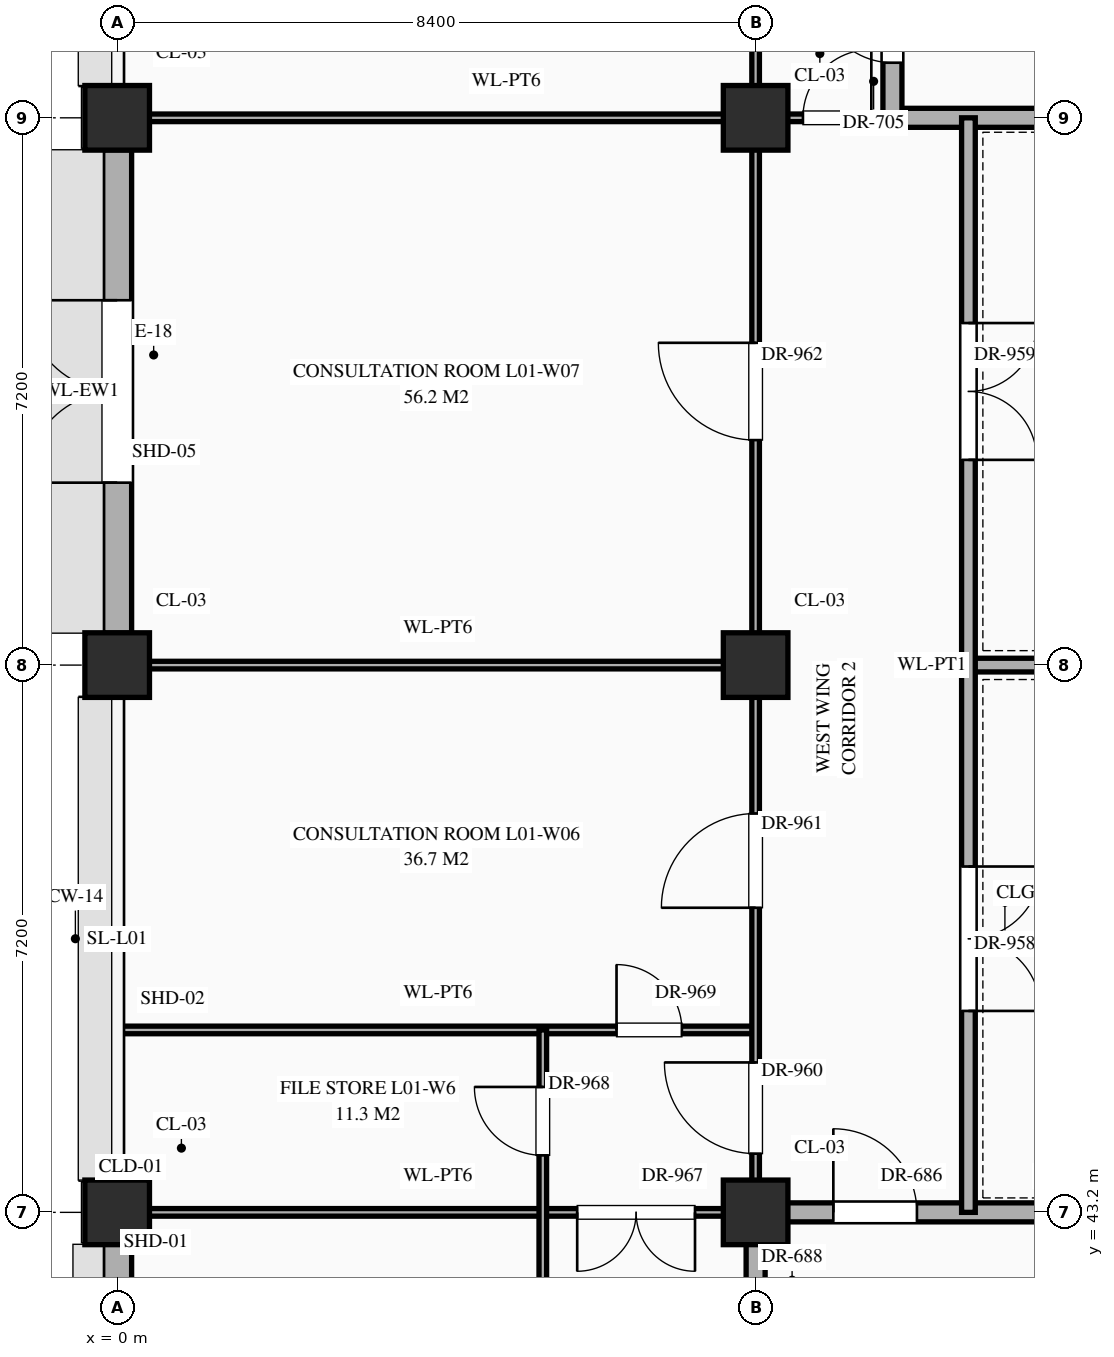
"""IFC4 building model, lengths in metres.
Left out: names, types, materials, properties, quantities, classifications, styles, units other than length and angle.
Written with IfcOpenShell. Run it as: python <this file> out.ifc"""

import sys

from ifc_helpers import new_model, si_unit, direction, frame, frame_2d, origin, origin_2d, place, context, subcontext, project, spatial, rectangle, extrude, element, fill, save


model = new_model("IFC4")
c1 = context("Model", 3, precision=1e-05, world=origin(), true_north=direction((0.0, 1.0)))
c2 = subcontext(c1, "Body", "Model", "MODEL_VIEW")
j1 = project(units=[si_unit("LENGTHUNIT", "METRE"), si_unit("PLANEANGLEUNIT", "RADIAN")], contexts=[c1])
p1 = place(None, origin())
s1 = spatial("IfcSite", under=j1, at=p1, CompositionType="ELEMENT")
p2 = place(p1, origin())
s2 = spatial("IfcBuilding", under=s1, at=p2, CompositionType="ELEMENT")
p3 = place(p2, origin())
s3 = spatial("IfcBuildingStorey", under=s2, at=p3, CompositionType="ELEMENT", Elevation=0.0)
for number, where, z_axis, x_axis in (
    (1, (0.0, 43.2, 0.0), (0.0, 0.0, 1.0), (1.0, 0.0, 0.0)),
    (2, (0.0, 50.4, 0.0), (0.0, 0.0, 1.0), (1.0, 0.0, 0.0)),
    (3, (0.0, 57.6, 0.0), (0.0, 0.0, 1.0), (1.0, 0.0, 0.0)),
    (4, (8.4, 43.2, 0.0), (0.0, 0.0, 1.0), (1.0, 0.0, 0.0)),
    (5, (8.4, 50.4, 0.0), (0.0, 0.0, 1.0), (1.0, 0.0, 0.0)),
    (6, (8.4, 57.6, 0.0), (0.0, 0.0, 1.0), (1.0, 0.0, 0.0)),
):
    element("IfcColumn", number, at=place(p3, frame(where, z_axis=z_axis, x_axis=x_axis)), inside=s3, PredefinedType="COLUMN", context=c2, shape_type="SweptSolid", body=[
        extrude(rectangle(XDim=0.85, YDim=0.85, at=origin_2d()), origin(), (0.0, 0.0, 1.0), 5.4),
    ])
p4 = place(p3, frame((0.0, 36.42, 0.0), z_axis=(0.0, 0.0, 1.0), x_axis=(0.0, 1.0, 0.0)))
e7 = element("IfcWall", 7, at=p4, inside=s3, PredefinedType="STANDARD", context=c2, shape_type="SweptSolid", body=[
    extrude(rectangle(XDim=6.36, YDim=0.38, at=frame_2d((3.18, 0.0))), origin(), (0.0, 0.0, 1.0), 4.47),
])
p5 = place(p4, frame((2.58, 0.0, 0.85)))
e8 = element("IfcOpeningElement", 8, at=p5, cuts=e7, PredefinedType="OPENING", context=c2, shape_type="SweptSolid", body=[
    extrude(rectangle(XDim=1.2, YDim=1.56, at=frame_2d((0.6, 0.78))), frame((0.0, 0.202, 0.0), z_axis=(0.0, -1.0, 0.0), x_axis=(1.0, 0.0, 0.0)), (0.0, 0.0, 1.0), 0.404),
])
p6 = place(p3, frame((0.0, 50.82, 0.0), z_axis=(0.0, 0.0, 1.0), x_axis=(0.0, 1.0, 0.0)))
e9 = element("IfcWall", 9, at=p6, inside=s3, PredefinedType="STANDARD", context=c2, shape_type="SweptSolid", body=[
    extrude(rectangle(XDim=6.36, YDim=0.38, at=frame_2d((3.18, 0.0))), origin(), (0.0, 0.0, 1.0), 4.47),
])
p7 = place(p6, frame((1.98, 0.0, 0.0)))
e10 = element("IfcOpeningElement", 10, at=p7, cuts=e9, PredefinedType="OPENING", context=c2, shape_type="SweptSolid", body=[
    extrude(rectangle(XDim=2.4, YDim=2.4, at=frame_2d((1.2, 1.2))), frame((0.0, 0.202, 0.0), z_axis=(0.0, -1.0, 0.0), x_axis=(1.0, 0.0, 0.0)), (0.0, 0.0, 1.0), 0.404),
])
p8 = place(p3, frame((0.04, 43.2, 0.0), z_axis=(0.0, 0.0, 1.0), x_axis=(1.0, 0.0, 0.0)))
e11 = element("IfcWall", 11, at=p8, inside=s3, PredefinedType="STANDARD", context=c2, shape_type="SweptSolid", body=[
    extrude(rectangle(XDim=8.36, YDim=0.1, at=frame_2d((4.18, 0.0))), origin(), (0.0, 0.0, 1.0), 4.27),
])
p9 = place(p8, frame((6.012, 0.0, 0.0)))
e12 = element("IfcOpeningElement", 12, at=p9, cuts=e11, PredefinedType="OPENING", context=c2, shape_type="SweptSolid", body=[
    extrude(rectangle(XDim=1.55, YDim=2.35, at=frame_2d((0.775, 1.175))), frame((0.0, 0.062, 0.0), z_axis=(0.0, -1.0, 0.0), x_axis=(1.0, 0.0, 0.0)), (0.0, 0.0, 1.0), 0.124),
])
p10 = place(p3, frame((8.4, 43.2, 0.0), z_axis=(0.0, 0.0, 1.0), x_axis=(1.0, 0.0, 0.0)))
e13 = element("IfcWall", 13, at=p10, inside=s3, PredefinedType="STANDARD", context=c2, shape_type="SweptSolid", body=[
    extrude(rectangle(XDim=8.36, YDim=0.25, at=frame_2d((4.18, 0.0))), origin(), (0.0, 0.0, 1.0), 4.27),
])
p11 = place(p10, frame((1.022, 0.0, 0.0)))
e14 = element("IfcOpeningElement", 14, at=p11, cuts=e13, PredefinedType="OPENING", context=c2, shape_type="SweptSolid", body=[
    extrude(rectangle(XDim=1.1, YDim=2.2, at=frame_2d((0.55, 1.1))), frame((0.0, 0.137, 0.0), z_axis=(0.0, -1.0, 0.0), x_axis=(1.0, 0.0, 0.0)), (0.0, 0.0, 1.0), 0.274),
])
p12 = place(p10, frame((4.627, 0.0, 0.0)))
e15 = element("IfcOpeningElement", 15, at=p12, cuts=e13, PredefinedType="OPENING", context=c2, shape_type="SweptSolid", body=[
    extrude(rectangle(XDim=1.6, YDim=2.3, at=frame_2d((0.8, 1.15))), frame((0.0, 0.137, 0.0), z_axis=(0.0, -1.0, 0.0), x_axis=(1.0, 0.0, 0.0)), (0.0, 0.0, 1.0), 0.274),
])
p13 = place(p3, frame((0.04, 45.6, 0.0), z_axis=(0.0, 0.0, 1.0), x_axis=(1.0, 0.0, 0.0)))
e16 = element("IfcWall", 16, at=p13, inside=s3, PredefinedType="STANDARD", context=c2, shape_type="SweptSolid", body=[
    extrude(rectangle(XDim=8.36, YDim=0.1, at=frame_2d((4.18, 0.0))), origin(), (0.0, 0.0, 1.0), 5.12),
])
p14 = place(p13, frame((6.53, 0.0, 0.0)))
e17 = element("IfcOpeningElement", 17, at=p14, cuts=e16, PredefinedType="OPENING", context=c2, shape_type="SweptSolid", body=[
    extrude(rectangle(XDim=0.86, YDim=2.1, at=frame_2d((0.43, 1.05))), frame((0.0, 0.062, 0.0), z_axis=(0.0, -1.0, 0.0), x_axis=(1.0, 0.0, 0.0)), (0.0, 0.0, 1.0), 0.124),
])
p15 = place(p3, frame((0.04, 50.4, 0.0), z_axis=(0.0, 0.0, 1.0), x_axis=(1.0, 0.0, 0.0)))
e18 = element("IfcWall", 18, at=p15, inside=s3, PredefinedType="STANDARD", context=c2, shape_type="SweptSolid", body=[
    extrude(rectangle(XDim=8.36, YDim=0.1, at=frame_2d((4.18, 0.0))), origin(), (0.0, 0.0, 1.0), 4.27),
])
p16 = place(p3, frame((11.2, 50.4, 0.0), z_axis=(0.0, 0.0, 1.0), x_axis=(1.0, 0.0, 0.0)))
e19 = element("IfcWall", 19, at=p16, inside=s3, PredefinedType="STANDARD", context=c2, shape_type="SweptSolid", body=[
    extrude(rectangle(XDim=5.56, YDim=0.18, at=frame_2d((2.78, 0.0))), origin(), (0.0, 0.0, 1.0), 4.27),
])
p17 = place(p3, frame((0.04, 57.6, 0.0), z_axis=(0.0, 0.0, 1.0), x_axis=(1.0, 0.0, 0.0)))
e20 = element("IfcWall", 20, at=p17, inside=s3, PredefinedType="STANDARD", context=c2, shape_type="SweptSolid", body=[
    extrude(rectangle(XDim=10.16, YDim=0.1, at=frame_2d((5.08, 0.0))), origin(), (0.0, 0.0, 1.0), 4.27),
])
p18 = place(p17, frame((8.982, 0.0, 0.0)))
e21 = element("IfcOpeningElement", 21, at=p18, cuts=e20, PredefinedType="OPENING", context=c2, shape_type="SweptSolid", body=[
    extrude(rectangle(XDim=0.9, YDim=2.15, at=frame_2d((0.45, 1.075))), frame((0.0, 0.062, 0.0), z_axis=(0.0, -1.0, 0.0), x_axis=(1.0, 0.0, 0.0)), (0.0, 0.0, 1.0), 0.124),
])
p19 = place(p3, frame((10.2, 57.6, 0.0), z_axis=(0.0, 0.0, 1.0), x_axis=(1.0, 0.0, 0.0)))
e22 = element("IfcWall", 22, at=p19, inside=s3, PredefinedType="STANDARD", context=c2, shape_type="SweptSolid", body=[
    extrude(rectangle(XDim=6.56, YDim=0.25, at=frame_2d((3.28, 0.0))), origin(), (0.0, 0.0, 1.0), 4.27),
])
p20 = place(p19, frame((2.877, 0.0, 0.0)))
e23 = element("IfcOpeningElement", 23, at=p20, cuts=e22, PredefinedType="OPENING", context=c2, shape_type="SweptSolid", body=[
    extrude(rectangle(XDim=1.5, YDim=2.25, at=frame_2d((0.75, 1.125))), frame((0.0, 0.137, 0.0), z_axis=(0.0, -1.0, 0.0), x_axis=(1.0, 0.0, 0.0)), (0.0, 0.0, 1.0), 0.274),
])
p21 = place(p3, frame((5.6, 33.6, 0.0), z_axis=(0.0, 0.0, 1.0), x_axis=(0.0, 1.0, 0.0)))
e24 = element("IfcWall", 24, at=p21, inside=s3, PredefinedType="STANDARD", context=c2, shape_type="SweptSolid", body=[
    extrude(rectangle(XDim=12.0, YDim=0.1, at=frame_2d((6.0, 0.0))), origin(), (0.0, 0.0, 1.0), 5.12),
])
p22 = place(p21, frame((0.71, 0.0, 0.0)))
e25 = element("IfcOpeningElement", 25, at=p22, cuts=e24, PredefinedType="OPENING", context=c2, shape_type="SweptSolid", body=[
    extrude(rectangle(XDim=0.98, YDim=2.35, at=frame_2d((0.49, 1.175))), frame((0.0, 0.062, 0.0), z_axis=(0.0, -1.0, 0.0), x_axis=(1.0, 0.0, 0.0)), (0.0, 0.0, 1.0), 0.124),
])
p23 = place(p21, frame((5.47, 0.0, 0.0)))
e26 = element("IfcOpeningElement", 26, at=p23, cuts=e24, PredefinedType="OPENING", context=c2, shape_type="SweptSolid", body=[
    extrude(rectangle(XDim=1.06, YDim=2.4, at=frame_2d((0.53, 1.2))), frame((0.0, 0.062, 0.0), z_axis=(0.0, -1.0, 0.0), x_axis=(1.0, 0.0, 0.0)), (0.0, 0.0, 1.0), 0.124),
])
p24 = place(p21, frame((10.35, 0.0, 0.0)))
e27 = element("IfcOpeningElement", 27, at=p24, cuts=e24, PredefinedType="OPENING", context=c2, shape_type="SweptSolid", body=[
    extrude(rectangle(XDim=0.9, YDim=2.15, at=frame_2d((0.45, 1.075))), frame((0.0, 0.062, 0.0), z_axis=(0.0, -1.0, 0.0), x_axis=(1.0, 0.0, 0.0)), (0.0, 0.0, 1.0), 0.124),
])
p25 = place(p3, frame((8.4, 40.8, 0.0), z_axis=(0.0, 0.0, 1.0), x_axis=(0.0, 1.0, 0.0)))
e28 = element("IfcWall", 28, at=p25, inside=s3, PredefinedType="STANDARD", context=c2, shape_type="SweptSolid", body=[
    extrude(rectangle(XDim=2.4, YDim=0.25, at=frame_2d((1.2, 0.0))), origin(), (0.0, 0.0, 1.0), 4.37),
])
p26 = place(p25, frame((0.552, 0.0, 0.0)))
e29 = element("IfcOpeningElement", 29, at=p26, cuts=e28, PredefinedType="OPENING", context=c2, shape_type="SweptSolid", body=[
    extrude(rectangle(XDim=0.95, YDim=2.15, at=frame_2d((0.475, 1.075))), frame((0.0, 0.137, 0.0), z_axis=(0.0, -1.0, 0.0), x_axis=(1.0, 0.0, 0.0)), (0.0, 0.0, 1.0), 0.274),
])
p27 = place(p3, frame((8.4, 43.2, 0.0), z_axis=(0.0, 0.0, 1.0), x_axis=(0.0, 1.0, 0.0)))
e30 = element("IfcWall", 30, at=p27, inside=s3, PredefinedType="STANDARD", context=c2, shape_type="SweptSolid", body=[
    extrude(rectangle(XDim=52.8, YDim=0.1, at=frame_2d((26.4, 0.0))), origin(), (0.0, 0.0, 1.0), 4.37),
])
p28 = place(p27, frame((51.272, 0.0, 0.0)))
e31 = element("IfcOpeningElement", 31, at=p28, cuts=e30, PredefinedType="OPENING", context=c2, shape_type="SweptSolid", body=[
    extrude(rectangle(XDim=1.0, YDim=2.25, at=frame_2d((0.5, 1.125))), frame((0.0, 0.062, 0.0), z_axis=(0.0, -1.0, 0.0), x_axis=(1.0, 0.0, 0.0)), (0.0, 0.0, 1.0), 0.124),
])
p29 = place(p27, frame((46.26, 0.0, 0.0)))
e32 = element("IfcOpeningElement", 32, at=p29, cuts=e30, PredefinedType="OPENING", context=c2, shape_type="SweptSolid", body=[
    extrude(rectangle(XDim=1.08, YDim=2.25, at=frame_2d((0.54, 1.125))), frame((0.0, 0.062, 0.0), z_axis=(0.0, -1.0, 0.0), x_axis=(1.0, 0.0, 0.0)), (0.0, 0.0, 1.0), 0.124),
])
p30 = place(p27, frame((41.268, 0.0, 0.0)))
e33 = element("IfcOpeningElement", 33, at=p30, cuts=e30, PredefinedType="OPENING", context=c2, shape_type="SweptSolid", body=[
    extrude(rectangle(XDim=1.12, YDim=2.25, at=frame_2d((0.56, 1.125))), frame((0.0, 0.062, 0.0), z_axis=(0.0, -1.0, 0.0), x_axis=(1.0, 0.0, 0.0)), (0.0, 0.0, 1.0), 0.124),
])
p31 = place(p27, frame((37.992, 0.0, 0.0)))
e34 = element("IfcOpeningElement", 34, at=p31, cuts=e30, PredefinedType="OPENING", context=c2, shape_type="SweptSolid", body=[
    extrude(rectangle(XDim=1.16, YDim=2.3, at=frame_2d((0.58, 1.15))), frame((0.0, 0.062, 0.0), z_axis=(0.0, -1.0, 0.0), x_axis=(1.0, 0.0, 0.0)), (0.0, 0.0, 1.0), 0.124),
])
p32 = place(p27, frame((17.38, 0.0, 0.0)))
e35 = element("IfcOpeningElement", 35, at=p32, cuts=e30, PredefinedType="OPENING", context=c2, shape_type="SweptSolid", body=[
    extrude(rectangle(XDim=1.24, YDim=2.3, at=frame_2d((0.62, 1.15))), frame((0.0, 0.062, 0.0), z_axis=(0.0, -1.0, 0.0), x_axis=(1.0, 0.0, 0.0)), (0.0, 0.0, 1.0), 0.124),
])
p33 = place(p27, frame((24.56, 0.0, 0.0)))
e36 = element("IfcOpeningElement", 36, at=p33, cuts=e30, PredefinedType="OPENING", context=c2, shape_type="SweptSolid", body=[
    extrude(rectangle(XDim=1.28, YDim=2.35, at=frame_2d((0.64, 1.175))), frame((0.0, 0.062, 0.0), z_axis=(0.0, -1.0, 0.0), x_axis=(1.0, 0.0, 0.0)), (0.0, 0.0, 1.0), 0.124),
])
p34 = place(p27, frame((31.93, 0.0, 0.0)))
e37 = element("IfcOpeningElement", 37, at=p34, cuts=e30, PredefinedType="OPENING", context=c2, shape_type="SweptSolid", body=[
    extrude(rectangle(XDim=0.94, YDim=2.3, at=frame_2d((0.47, 1.15))), frame((0.0, 0.062, 0.0), z_axis=(0.0, -1.0, 0.0), x_axis=(1.0, 0.0, 0.0)), (0.0, 0.0, 1.0), 0.124),
])
p35 = place(p27, frame((0.772, 0.0, 0.0)))
e38 = element("IfcOpeningElement", 38, at=p35, cuts=e30, PredefinedType="OPENING", context=c2, shape_type="SweptSolid", body=[
    extrude(rectangle(XDim=1.2, YDim=2.35, at=frame_2d((0.6, 1.175))), frame((0.0, 0.062, 0.0), z_axis=(0.0, -1.0, 0.0), x_axis=(1.0, 0.0, 0.0)), (0.0, 0.0, 1.0), 0.124),
])
p36 = place(p27, frame((4.008, 0.0, 0.0)))
e39 = element("IfcOpeningElement", 39, at=p36, cuts=e30, PredefinedType="OPENING", context=c2, shape_type="SweptSolid", body=[
    extrude(rectangle(XDim=1.24, YDim=2.3, at=frame_2d((0.62, 1.15))), frame((0.0, 0.062, 0.0), z_axis=(0.0, -1.0, 0.0), x_axis=(1.0, 0.0, 0.0)), (0.0, 0.0, 1.0), 0.124),
])
p37 = place(p27, frame((10.16, 0.0, 0.0)))
e40 = element("IfcOpeningElement", 40, at=p37, cuts=e30, PredefinedType="OPENING", context=c2, shape_type="SweptSolid", body=[
    extrude(rectangle(XDim=1.28, YDim=2.35, at=frame_2d((0.64, 1.175))), frame((0.0, 0.062, 0.0), z_axis=(0.0, -1.0, 0.0), x_axis=(1.0, 0.0, 0.0)), (0.0, 0.0, 1.0), 0.124),
])
p38 = place(p3, frame((10.2, 57.6, 0.0), z_axis=(0.0, 0.0, 1.0), x_axis=(0.0, 1.0, 0.0)))
e41 = element("IfcWall", 41, at=p38, inside=s3, PredefinedType="STANDARD", context=c2, shape_type="SweptSolid", body=[
    extrude(rectangle(XDim=2.4, YDim=0.25, at=frame_2d((1.2, 0.0))), origin(), (0.0, 0.0, 1.0), 5.12),
])
p39 = place(p38, frame((0.725, 0.0, 0.0)))
e42 = element("IfcOpeningElement", 42, at=p39, cuts=e41, PredefinedType="OPENING", context=c2, shape_type="SweptSolid", body=[
    extrude(rectangle(XDim=0.95, YDim=2.15, at=frame_2d((0.475, 1.075))), frame((0.0, 0.137, 0.0), z_axis=(0.0, -1.0, 0.0), x_axis=(1.0, 0.0, 0.0)), (0.0, 0.0, 1.0), 0.274),
])
p40 = place(p3, frame((11.2, 43.2, 0.0), z_axis=(0.0, 0.0, 1.0), x_axis=(0.0, 1.0, 0.0)))
e43 = element("IfcWall", 43, at=p40, inside=s3, PredefinedType="STANDARD", context=c2, shape_type="SweptSolid", body=[
    extrude(rectangle(XDim=14.4, YDim=0.18, at=frame_2d((7.2, 0.0))), origin(), (0.0, 0.0, 1.0), 5.12),
])
p41 = place(p40, frame((2.65, 0.0, 0.0)))
e44 = element("IfcOpeningElement", 44, at=p41, cuts=e43, PredefinedType="OPENING", context=c2, shape_type="SweptSolid", body=[
    extrude(rectangle(XDim=1.9, YDim=2.5, at=frame_2d((0.95, 1.25))), frame((0.0, 0.102, 0.0), z_axis=(0.0, -1.0, 0.0), x_axis=(1.0, 0.0, 0.0)), (0.0, 0.0, 1.0), 0.204),
])
p42 = place(p40, frame((9.9, 0.0, 0.0)))
e45 = element("IfcOpeningElement", 45, at=p42, cuts=e43, PredefinedType="OPENING", context=c2, shape_type="SweptSolid", body=[
    extrude(rectangle(XDim=1.8, YDim=2.5, at=frame_2d((0.9, 1.25))), frame((0.0, 0.102, 0.0), z_axis=(0.0, -1.0, 0.0), x_axis=(1.0, 0.0, 0.0)), (0.0, 0.0, 1.0), 0.204),
])
p43 = place(p7, origin())
e46 = element("IfcDoor", 46, at=p43, inside=s3, OperationType="DOUBLE_DOOR_SINGLE_SWING", PredefinedType="DOOR", context=c2, shape_type="SweptSolid", body=[
    extrude(rectangle(XDim=2.4, YDim=2.4, at=frame_2d((1.2, 1.2))), frame((0.0, 0.025, 0.0), z_axis=(0.0, -1.0, 0.0), x_axis=(1.0, 0.0, 0.0)), (0.0, 0.0, 1.0), 0.05),
])
fill(e10, e46)
p44 = place(p11, origin())
e47 = element("IfcDoor", 47, at=p44, inside=s3, OperationType="SINGLE_SWING_LEFT", PredefinedType="DOOR", context=c2, shape_type="SweptSolid", body=[
    extrude(rectangle(XDim=1.1, YDim=2.2, at=frame_2d((0.55, 1.1))), frame((0.0, 0.025, 0.0), z_axis=(0.0, -1.0, 0.0), x_axis=(1.0, 0.0, 0.0)), (0.0, 0.0, 1.0), 0.05),
])
fill(e14, e47)
p45 = place(p39, origin())
e48 = element("IfcDoor", 48, at=p45, inside=s3, OperationType="SINGLE_SWING_RIGHT", PredefinedType="DOOR", context=c2, shape_type="SweptSolid", body=[
    extrude(rectangle(XDim=0.95, YDim=2.15, at=frame_2d((0.475, 1.075))), frame((0.0, 0.025, 0.0), z_axis=(0.0, -1.0, 0.0), x_axis=(1.0, 0.0, 0.0)), (0.0, 0.0, 1.0), 0.05),
])
fill(e42, e48)
p46 = place(p18, origin())
e49 = element("IfcDoor", 49, at=p46, inside=s3, OperationType="SINGLE_SWING_RIGHT", PredefinedType="DOOR", context=c2, shape_type="SweptSolid", body=[
    extrude(rectangle(XDim=0.9, YDim=2.15, at=frame_2d((0.45, 1.075))), frame((0.0, 0.025, 0.0), z_axis=(0.0, -1.0, 0.0), x_axis=(1.0, 0.0, 0.0)), (0.0, 0.0, 1.0), 0.05),
])
fill(e21, e49)
p47 = place(p41, frame((1.9, 0.0, 0.0), z_axis=(0.0, 0.0, 1.0), x_axis=(-1.0, 0.0, 0.0)))
e50 = element("IfcDoor", 50, at=p47, inside=s3, OperationType="DOUBLE_DOOR_SINGLE_SWING", PredefinedType="DOOR", context=c2, shape_type="SweptSolid", body=[
    extrude(rectangle(XDim=1.9, YDim=2.5, at=frame_2d((0.95, 1.25))), frame((0.0, 0.025, 0.0), z_axis=(0.0, -1.0, 0.0), x_axis=(1.0, 0.0, 0.0)), (0.0, 0.0, 1.0), 0.05),
])
fill(e44, e50)
p48 = place(p42, frame((1.8, 0.0, 0.0), z_axis=(0.0, 0.0, 1.0), x_axis=(-1.0, 0.0, 0.0)))
e51 = element("IfcDoor", 51, at=p48, inside=s3, OperationType="DOUBLE_DOOR_SINGLE_SWING", PredefinedType="DOOR", context=c2, shape_type="SweptSolid", body=[
    extrude(rectangle(XDim=1.8, YDim=2.5, at=frame_2d((0.9, 1.25))), frame((0.0, 0.025, 0.0), z_axis=(0.0, -1.0, 0.0), x_axis=(1.0, 0.0, 0.0)), (0.0, 0.0, 1.0), 0.05),
])
fill(e45, e51)
p49 = place(p35, origin())
e52 = element("IfcDoor", 52, at=p49, inside=s3, OperationType="SINGLE_SWING_RIGHT", PredefinedType="DOOR", context=c2, shape_type="SweptSolid", body=[
    extrude(rectangle(XDim=1.2, YDim=2.35, at=frame_2d((0.6, 1.175))), frame((0.0, 0.025, 0.0), z_axis=(0.0, -1.0, 0.0), x_axis=(1.0, 0.0, 0.0)), (0.0, 0.0, 1.0), 0.05),
])
fill(e38, e52)
p50 = place(p36, origin())
e53 = element("IfcDoor", 53, at=p50, inside=s3, OperationType="SINGLE_SWING_LEFT", PredefinedType="DOOR", context=c2, shape_type="SweptSolid", body=[
    extrude(rectangle(XDim=1.24, YDim=2.3, at=frame_2d((0.62, 1.15))), frame((0.0, 0.025, 0.0), z_axis=(0.0, -1.0, 0.0), x_axis=(1.0, 0.0, 0.0)), (0.0, 0.0, 1.0), 0.05),
])
fill(e39, e53)
p51 = place(p37, origin())
e54 = element("IfcDoor", 54, at=p51, inside=s3, OperationType="SINGLE_SWING_RIGHT", PredefinedType="DOOR", context=c2, shape_type="SweptSolid", body=[
    extrude(rectangle(XDim=1.28, YDim=2.35, at=frame_2d((0.64, 1.175))), frame((0.0, 0.025, 0.0), z_axis=(0.0, -1.0, 0.0), x_axis=(1.0, 0.0, 0.0)), (0.0, 0.0, 1.0), 0.05),
])
fill(e40, e54)
p52 = place(p9, frame((1.55, 0.0, 0.0), z_axis=(0.0, 0.0, 1.0), x_axis=(-1.0, 0.0, 0.0)))
e55 = element("IfcDoor", 55, at=p52, inside=s3, OperationType="DOUBLE_DOOR_SINGLE_SWING", PredefinedType="DOOR", context=c2, shape_type="SweptSolid", body=[
    extrude(rectangle(XDim=1.55, YDim=2.35, at=frame_2d((0.775, 1.175))), frame((0.0, 0.025, 0.0), z_axis=(0.0, -1.0, 0.0), x_axis=(1.0, 0.0, 0.0)), (0.0, 0.0, 1.0), 0.05),
])
fill(e12, e55)
p53 = place(p24, origin())
e56 = element("IfcDoor", 56, at=p53, inside=s3, OperationType="SINGLE_SWING_RIGHT", PredefinedType="DOOR", context=c2, shape_type="SweptSolid", body=[
    extrude(rectangle(XDim=0.9, YDim=2.15, at=frame_2d((0.45, 1.075))), frame((0.0, 0.025, 0.0), z_axis=(0.0, -1.0, 0.0), x_axis=(1.0, 0.0, 0.0)), (0.0, 0.0, 1.0), 0.05),
])
fill(e27, e56)
p54 = place(p14, origin())
e57 = element("IfcDoor", 57, at=p54, inside=s3, OperationType="SINGLE_SWING_LEFT", PredefinedType="DOOR", context=c2, shape_type="SweptSolid", body=[
    extrude(rectangle(XDim=0.86, YDim=2.1, at=frame_2d((0.43, 1.05))), frame((0.0, 0.025, 0.0), z_axis=(0.0, -1.0, 0.0), x_axis=(1.0, 0.0, 0.0)), (0.0, 0.0, 1.0), 0.05),
])
fill(e17, e57)
save(model, sys.argv[1])
